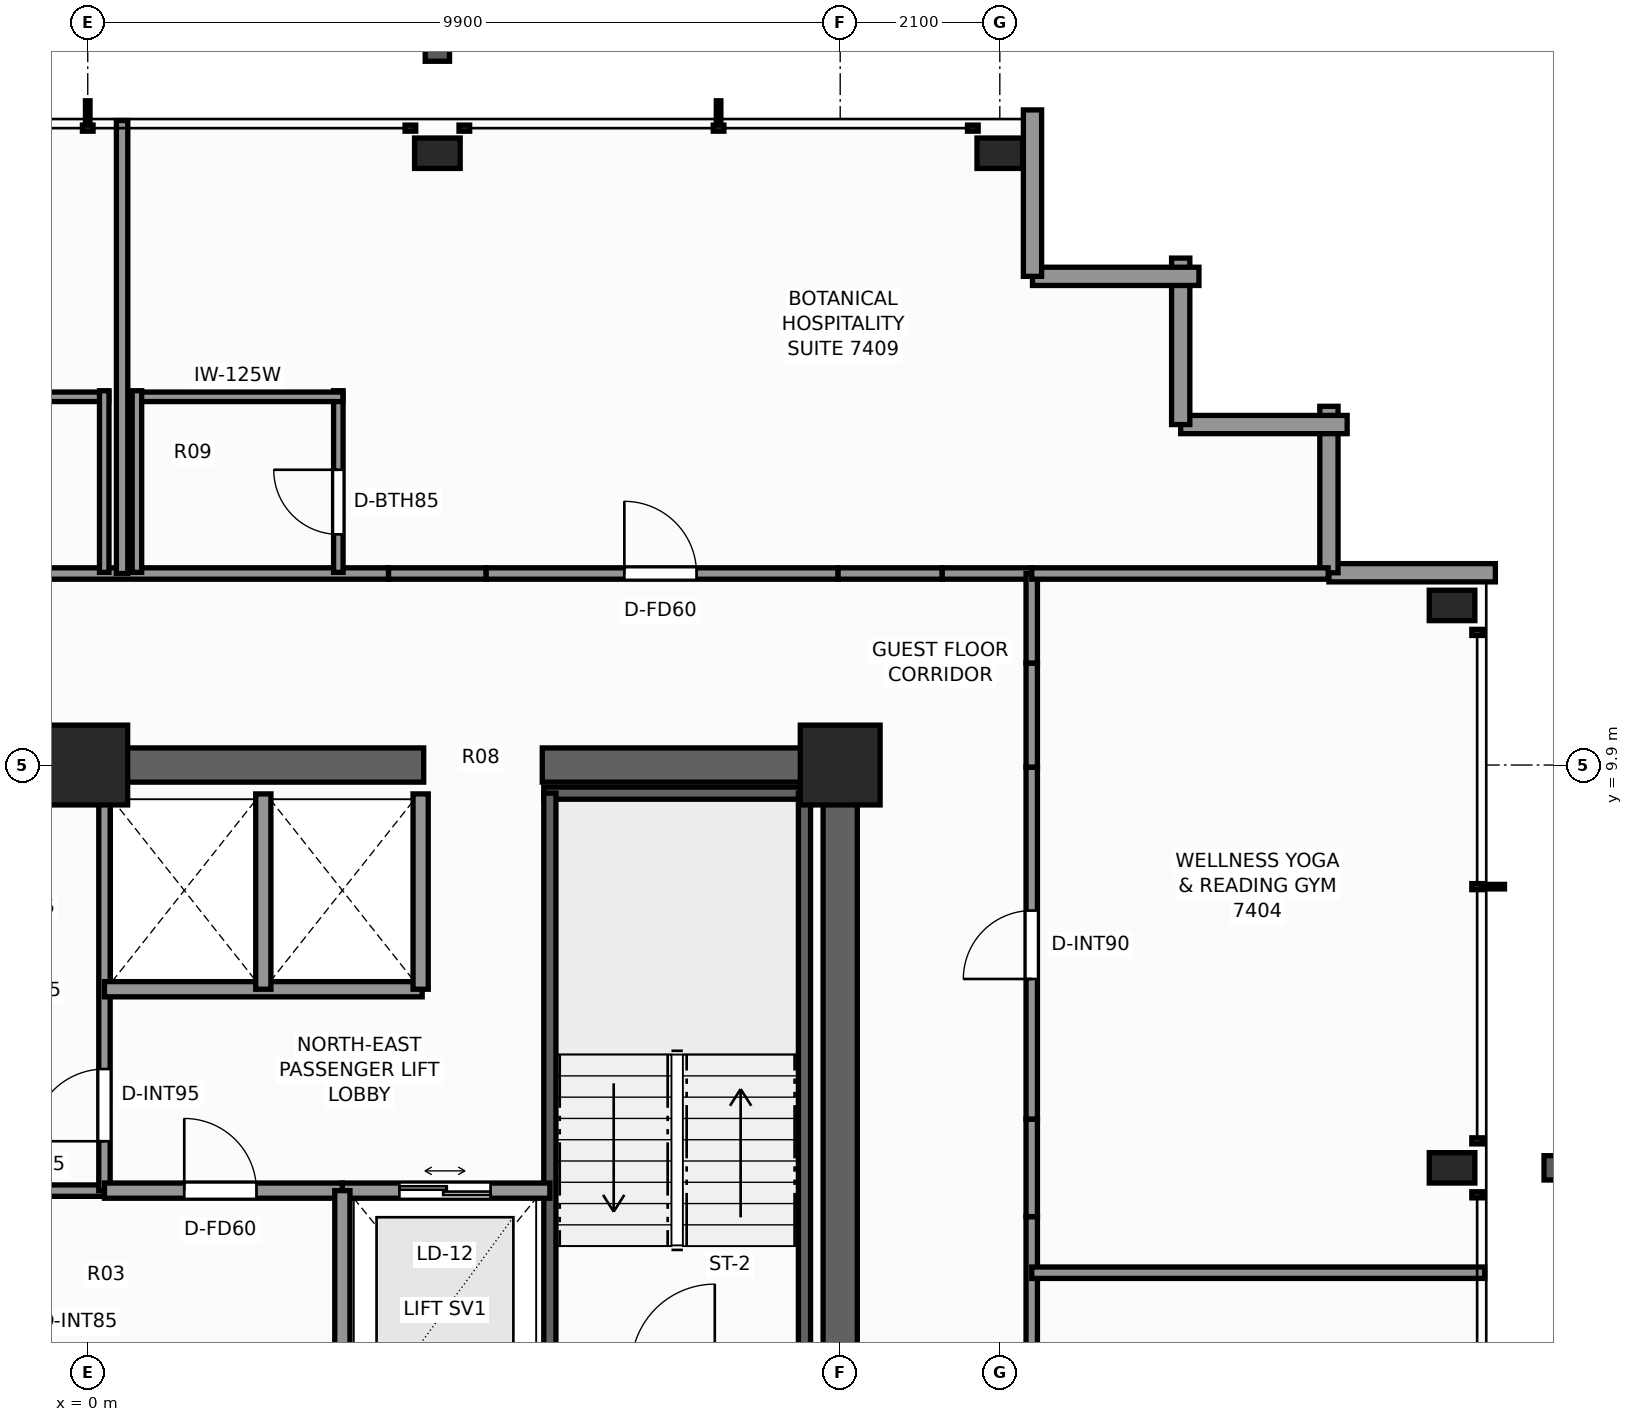
"""IFC4 building model, lengths in metres.
Left out: names, types, materials, properties, quantities, classifications, styles, units other than length and angle.
Written with IfcOpenShell. Run it as: python <this file> out.ifc"""

import sys

from ifc_helpers import new_model, si_unit, direction, frame, frame_2d, origin, origin_2d, place, context, subcontext, project, spatial, rectangle, extrude, element, fill, save


model = new_model("IFC4")
c1 = context("Model", 3, precision=1e-05, world=origin(), true_north=direction((0.0, 1.0)))
c2 = subcontext(c1, "Body", "Model", "MODEL_VIEW")
j1 = project(units=[si_unit("LENGTHUNIT", "METRE"), si_unit("PLANEANGLEUNIT", "RADIAN")], contexts=[c1])
p1 = place(None, origin())
s1 = spatial("IfcSite", under=j1, at=p1, CompositionType="ELEMENT")
p2 = place(p1, origin())
s2 = spatial("IfcBuilding", under=s1, at=p2, CompositionType="ELEMENT")
p3 = place(p2, frame((0.0, 0.0, 254.9)))
s3 = spatial("IfcBuildingStorey", under=s2, at=p3, CompositionType="ELEMENT", Elevation=254.9)
p4 = place(p3, frame((-10.125, 9.9, 0.0), z_axis=(0.0, 0.0, 1.0), x_axis=(1.0, 0.0, 0.0)))
e1 = element("IfcWall", 1, at=p4, inside=s3, PredefinedType="SHEAR", context=c2, shape_type="SweptSolid", body=[
    extrude(rectangle(XDim=14.545, YDim=0.45, at=frame_2d((7.272, 0.0))), origin(), (0.0, 0.0, 1.0), 3.5),
])
p5 = place(p3, frame((5.98, 9.9, 0.0), z_axis=(0.0, 0.0, 1.0), x_axis=(1.0, 0.0, 0.0)))
e2 = element("IfcWall", 2, at=p5, inside=s3, PredefinedType="SHEAR", context=c2, shape_type="SweptSolid", body=[
    extrude(rectangle(XDim=4.145, YDim=0.45, at=frame_2d((2.073, 0.0))), origin(), (0.0, 0.0, 1.0), 3.5),
])
p6 = place(p3, frame((9.9, -3.7, 0.0), z_axis=(0.0, 0.0, 1.0), x_axis=(0.0, 1.0, 0.0)))
e3 = element("IfcWall", 3, at=p6, inside=s3, PredefinedType="SHEAR", context=c2, shape_type="SweptSolid", body=[
    extrude(rectangle(XDim=13.375, YDim=0.45, at=frame_2d((6.688, 0.0))), origin(), (0.0, 0.0, 1.0), 3.5),
])
p7 = place(p6, frame((0.35, 0.0, 0.0)))
e4 = element("IfcOpeningElement", 4, at=p7, cuts=e3, PredefinedType="OPENING", context=c2, shape_type="SweptSolid", body=[
    extrude(rectangle(XDim=1.1, YDim=2.2, at=frame_2d((0.55, 1.1))), frame((0.0, 0.235, 0.0), z_axis=(0.0, -1.0, 0.0), x_axis=(1.0, 0.0, 0.0)), (0.0, 0.0, 1.0), 0.47),
])
for number, where, z_axis, x_axis in (
    (5, (9.9, 9.9, 0.0), (0.0, 0.0, 1.0), (1.0, 0.0, 0.0)),
    (6, (0.0, 9.9, 0.0), (0.0, 0.0, 1.0), (1.0, 0.0, 0.0)),
):
    element("IfcColumn", number, at=place(p3, frame(where, z_axis=z_axis, x_axis=x_axis)), inside=s3, PredefinedType="COLUMN", context=c2, shape_type="SweptSolid", body=[
        extrude(rectangle(XDim=1.05, YDim=1.05, at=origin_2d()), origin(), (0.0, 0.0, 1.0), 3.5),
    ])
for number, where, z_axis, x_axis in (
    (7, (4.6, 17.95, 0.0), (0.0, 0.0, 1.0), (1.0, 0.0, 0.0)),
    (8, (12.0, 17.95, 0.0), (0.0, 0.0, 1.0), (1.0, 0.0, 0.0)),
    (9, (17.95, 4.6, 0.0), (0.0, 0.0, 1.0), (1.0, 0.0, 0.0)),
    (10, (17.95, 12.0, 0.0), (0.0, 0.0, 1.0), (1.0, 0.0, 0.0)),
):
    element("IfcColumn", number, at=place(p3, frame(where, z_axis=z_axis, x_axis=x_axis)), inside=s3, PredefinedType="COLUMN", context=c2, shape_type="SweptSolid", body=[
        extrude(rectangle(XDim=0.6, YDim=0.4, at=origin_2d()), origin(), (0.0, 0.0, 1.0), 3.5),
    ])
p8 = place(p3, frame((16.33, 12.43, 0.0), z_axis=(0.0, 0.0, 1.0), x_axis=(1.0, 0.0, 0.0)))
e11 = element("IfcWall", 11, at=p8, inside=s3, PredefinedType="STANDARD", context=c2, shape_type="SweptSolid", body=[
    extrude(rectangle(XDim=2.19, YDim=0.24, at=frame_2d((1.095, 0.0))), origin(), (0.0, 0.0, 1.0), 1.415),
])
for number, where, z_axis, x_axis in (
    (12, (16.33, 14.62, 0.0), (0.0, 0.0, 1.0), (0.0, -1.0, 0.0)),
    (13, (14.38, 14.38, 0.0), (0.0, 0.0, 1.0), (1.0, 0.0, 0.0)),
    (14, (14.38, 16.57, 0.0), (0.0, 0.0, 1.0), (0.0, -1.0, 0.0)),
    (15, (12.43, 16.33, 0.0), (0.0, 0.0, 1.0), (1.0, 0.0, 0.0)),
):
    element("IfcWall", number, at=place(p3, frame(where, z_axis=z_axis, x_axis=x_axis)), inside=s3, PredefinedType="STANDARD", context=c2, shape_type="SweptSolid", body=[
        extrude(rectangle(XDim=2.19, YDim=0.24, at=frame_2d((1.095, 0.0))), origin(), (0.0, 0.0, 1.0), 2.603),
    ])
p9 = place(p3, frame((12.43, 18.52, 0.0), z_axis=(0.0, 0.0, 1.0), x_axis=(0.0, -1.0, 0.0)))
e16 = element("IfcWall", 16, at=p9, inside=s3, PredefinedType="STANDARD", context=c2, shape_type="SweptSolid", body=[
    extrude(rectangle(XDim=2.19, YDim=0.24, at=frame_2d((1.095, 0.0))), origin(), (0.0, 0.0, 1.0), 1.415),
])
p10 = place(p3, frame((6.0, 9.53, 0.0), z_axis=(0.0, 0.0, 1.0), x_axis=(1.0, 0.0, 0.0)))
e17 = element("IfcWall", 17, at=p10, inside=s3, PredefinedType="SHEAR", context=c2, shape_type="SweptSolid", body=[
    extrude(rectangle(XDim=3.52, YDim=0.16, at=frame_2d((1.76, 0.0))), origin(), (0.0, 0.0, 1.0), 3.5),
])
for number, where, z_axis, x_axis in (
    (18, (6.08, 1.97, 0.0), (0.0, 0.0, 1.0), (0.0, 1.0, 0.0)),
    (19, (9.43, 1.97, 0.0), (0.0, 0.0, 1.0), (0.0, 1.0, 0.0)),
):
    element("IfcWall", number, at=place(p3, frame(where, z_axis=z_axis, x_axis=x_axis)), inside=s3, PredefinedType="SHEAR", context=c2, shape_type="SweptSolid", body=[
        extrude(rectangle(XDim=7.56, YDim=0.16, at=frame_2d((3.78, 0.0))), origin(), (0.0, 0.0, 1.0), 3.5),
    ])
p11 = place(p3, frame((3.35, 4.3, 0.0), z_axis=(0.0, 0.0, 1.0), x_axis=(1.0, 0.0, 0.0)))
e20 = element("IfcWall", 20, at=p11, inside=s3, PredefinedType="SOLIDWALL", context=c2, shape_type="SweptSolid", body=[
    extrude(rectangle(XDim=2.73, YDim=0.2, at=frame_2d((1.365, 0.0))), origin(), (0.0, 0.0, 1.0), 3.22),
])
p12 = place(p11, frame((0.75, 0.0, 0.0)))
e21 = element("IfcOpeningElement", 21, at=p12, cuts=e20, PredefinedType="OPENING", context=c2, shape_type="SweptSolid", body=[
    extrude(rectangle(XDim=1.2, YDim=2.25, at=frame_2d((0.6, 1.125))), frame((0.0, 0.11, 0.0), z_axis=(0.0, -1.0, 0.0), x_axis=(1.0, 0.0, 0.0)), (0.0, 0.0, 1.0), 0.22),
])
p13 = place(p3, frame((-6.08, 4.3, 0.0), z_axis=(0.0, 0.0, 1.0), x_axis=(1.0, 0.0, 0.0)))
e22 = element("IfcWall", 22, at=p13, inside=s3, PredefinedType="PARTITIONING", context=c2, shape_type="SweptSolid", body=[
    extrude(rectangle(XDim=6.3, YDim=0.15, at=frame_2d((3.15, 0.0))), origin(), (0.0, 0.0, 1.0), 3.22),
])
p14 = place(p13, frame((1.05, 0.0, 0.0)))
e23 = element("IfcOpeningElement", 23, at=p14, cuts=e22, PredefinedType="OPENING", context=c2, shape_type="SweptSolid", body=[
    extrude(rectangle(XDim=0.85, YDim=2.03, at=frame_2d((0.425, 1.015))), frame((0.0, 0.085, 0.0), z_axis=(0.0, -1.0, 0.0), x_axis=(1.0, 0.0, 0.0)), (0.0, 0.0, 1.0), 0.17),
])
p15 = place(p3, frame((0.22, 4.3, 0.0), z_axis=(0.0, 0.0, 1.0), x_axis=(0.0, 1.0, 0.0)))
e24 = element("IfcWall", 24, at=p15, inside=s3, PredefinedType="PARTITIONING", context=c2, shape_type="SweptSolid", body=[
    extrude(rectangle(XDim=5.22, YDim=0.15, at=frame_2d((2.61, 0.0))), origin(), (0.0, 0.0, 1.0), 3.22),
])
p16 = place(p15, frame((0.65, 0.0, 0.0)))
e25 = element("IfcOpeningElement", 25, at=p16, cuts=e24, PredefinedType="OPENING", context=c2, shape_type="SweptSolid", body=[
    extrude(rectangle(XDim=0.95, YDim=2.06, at=frame_2d((0.475, 1.03))), frame((0.0, 0.085, 0.0), z_axis=(0.0, -1.0, 0.0), x_axis=(1.0, 0.0, 0.0)), (0.0, 0.0, 1.0), 0.17),
])
p17 = place(p3, frame((0.22, 6.95, 0.0), z_axis=(0.0, 0.0, 1.0), x_axis=(1.0, 0.0, 0.0)))
e26 = element("IfcWall", 26, at=p17, inside=s3, PredefinedType="SOLIDWALL", context=c2, shape_type="SweptSolid", body=[
    extrude(rectangle(XDim=4.18, YDim=0.2, at=frame_2d((2.09, 0.0))), origin(), (0.0, 0.0, 1.0), 3.22),
])
for number, where, z_axis, x_axis in (
    (27, (4.38, 6.95, 0.0), (0.0, 0.0, 1.0), (0.0, 1.0, 0.0)),
    (28, (2.31, 6.95, 0.0), (0.0, 0.0, 1.0), (0.0, 1.0, 0.0)),
):
    element("IfcWall", number, at=place(p3, frame(where, z_axis=z_axis, x_axis=x_axis)), inside=s3, PredefinedType="SOLIDWALL", context=c2, shape_type="SweptSolid", body=[
        extrude(rectangle(XDim=2.57, YDim=0.2, at=frame_2d((1.285, 0.0))), origin(), (0.0, 0.0, 1.0), 3.22),
    ])
p18 = place(p3, frame((0.22, 4.3, 0.0), z_axis=(0.0, 0.0, 1.0), x_axis=(1.0, 0.0, 0.0)))
e29 = element("IfcWall", 29, at=p18, inside=s3, PredefinedType="SOLIDWALL", context=c2, shape_type="SweptSolid", body=[
    extrude(rectangle(XDim=3.13, YDim=0.2, at=frame_2d((1.565, 0.0))), origin(), (0.0, 0.0, 1.0), 3.22),
])
p19 = place(p18, frame((1.05, 0.0, 0.0)))
e30 = element("IfcOpeningElement", 30, at=p19, cuts=e29, PredefinedType="OPENING", context=c2, shape_type="SweptSolid", body=[
    extrude(rectangle(XDim=0.95, YDim=2.06, at=frame_2d((0.475, 1.03))), frame((0.0, 0.11, 0.0), z_axis=(0.0, -1.0, 0.0), x_axis=(1.0, 0.0, 0.0)), (0.0, 0.0, 1.0), 0.22),
])
p20 = place(p3, frame((3.35, 1.1, 0.0), z_axis=(0.0, 0.0, 1.0), x_axis=(0.0, 1.0, 0.0)))
e31 = element("IfcWall", 31, at=p20, inside=s3, PredefinedType="SOLIDWALL", context=c2, shape_type="SweptSolid", body=[
    extrude(rectangle(XDim=3.2, YDim=0.2, at=frame_2d((1.6, 0.0))), origin(), (0.0, 0.0, 1.0), 3.22),
])
p21 = place(p3, frame((-3.958, 12.42, 0.0), z_axis=(0.0, 0.0, 1.0), x_axis=(1.0, 0.0, 0.0)))
e32 = element("IfcWall", 32, at=p21, inside=s3, PredefinedType="PARTITIONING", context=c2, shape_type="SweptSolid", body=[
    extrude(rectangle(XDim=7.916, YDim=0.15, at=frame_2d((3.958, 0.0))), origin(), (0.0, 0.0, 1.0), 2.745),
])
p22 = place(p3, frame((3.958, 12.42, 0.0), z_axis=(0.0, 0.0, 1.0), x_axis=(1.0, 0.0, 0.0)))
e33 = element("IfcWall", 33, at=p22, inside=s3, PredefinedType="PARTITIONING", context=c2, shape_type="SweptSolid", body=[
    extrude(rectangle(XDim=1.284, YDim=0.15, at=frame_2d((0.642, 0.0))), origin(), (0.0, 0.0, 1.0), 1.405),
])
p23 = place(p3, frame((5.242, 12.42, 0.0), z_axis=(0.0, 0.0, 1.0), x_axis=(1.0, 0.0, 0.0)))
e34 = element("IfcWall", 34, at=p23, inside=s3, PredefinedType="PARTITIONING", context=c2, shape_type="SweptSolid", body=[
    extrude(rectangle(XDim=4.63, YDim=0.15, at=frame_2d((2.315, 0.0))), origin(), (0.0, 0.0, 1.0), 3.22),
])
p24 = place(p23, frame((1.818, 0.0, 0.0)))
e35 = element("IfcOpeningElement", 35, at=p24, cuts=e34, PredefinedType="OPENING", context=c2, shape_type="SweptSolid", body=[
    extrude(rectangle(XDim=0.95, YDim=2.06, at=frame_2d((0.475, 1.03))), frame((0.0, 0.085, 0.0), z_axis=(0.0, -1.0, 0.0), x_axis=(1.0, 0.0, 0.0)), (0.0, 0.0, 1.0), 0.17),
])
p25 = place(p3, frame((9.872, 12.42, 0.0), z_axis=(0.0, 0.0, 1.0), x_axis=(1.0, 0.0, 0.0)))
e36 = element("IfcWall", 36, at=p25, inside=s3, PredefinedType="PARTITIONING", context=c2, shape_type="SweptSolid", body=[
    extrude(rectangle(XDim=1.37, YDim=0.15, at=frame_2d((0.685, 0.0))), origin(), (0.0, 0.0, 1.0), 1.405),
])
p26 = place(p3, frame((11.242, 12.42, 0.0), z_axis=(0.0, 0.0, 1.0), x_axis=(1.0, 0.0, 0.0)))
e37 = element("IfcWall", 37, at=p26, inside=s3, PredefinedType="PARTITIONING", context=c2, shape_type="SweptSolid", body=[
    extrude(rectangle(XDim=1.177, YDim=0.15, at=frame_2d((0.589, 0.0))), origin(), (0.0, 0.0, 1.0), 3.22),
])
p27 = place(p3, frame((12.42, -3.958, 0.0), z_axis=(0.0, 0.0, 1.0), x_axis=(0.0, 1.0, 0.0)))
e38 = element("IfcWall", 38, at=p27, inside=s3, PredefinedType="PARTITIONING", context=c2, shape_type="SweptSolid", body=[
    extrude(rectangle(XDim=7.916, YDim=0.15, at=frame_2d((3.958, 0.0))), origin(), (0.0, 0.0, 1.0), 2.745),
])
p28 = place(p3, frame((12.42, 3.958, 0.0), z_axis=(0.0, 0.0, 1.0), x_axis=(0.0, 1.0, 0.0)))
e39 = element("IfcWall", 39, at=p28, inside=s3, PredefinedType="PARTITIONING", context=c2, shape_type="SweptSolid", body=[
    extrude(rectangle(XDim=1.284, YDim=0.15, at=frame_2d((0.642, 0.0))), origin(), (0.0, 0.0, 1.0), 1.405),
])
p29 = place(p3, frame((12.42, 5.242, 0.0), z_axis=(0.0, 0.0, 1.0), x_axis=(0.0, 1.0, 0.0)))
e40 = element("IfcWall", 40, at=p29, inside=s3, PredefinedType="PARTITIONING", context=c2, shape_type="SweptSolid", body=[
    extrude(rectangle(XDim=4.63, YDim=0.15, at=frame_2d((2.315, 0.0))), origin(), (0.0, 0.0, 1.0), 3.22),
])
p30 = place(p29, frame((1.843, 0.0, 0.0)))
e41 = element("IfcOpeningElement", 41, at=p30, cuts=e40, PredefinedType="OPENING", context=c2, shape_type="SweptSolid", body=[
    extrude(rectangle(XDim=0.9, YDim=2.06, at=frame_2d((0.45, 1.03))), frame((0.0, 0.085, 0.0), z_axis=(0.0, -1.0, 0.0), x_axis=(1.0, 0.0, 0.0)), (0.0, 0.0, 1.0), 0.17),
])
p31 = place(p3, frame((12.42, 9.872, 0.0), z_axis=(0.0, 0.0, 1.0), x_axis=(0.0, 1.0, 0.0)))
e42 = element("IfcWall", 42, at=p31, inside=s3, PredefinedType="PARTITIONING", context=c2, shape_type="SweptSolid", body=[
    extrude(rectangle(XDim=1.37, YDim=0.15, at=frame_2d((0.685, 0.0))), origin(), (0.0, 0.0, 1.0), 1.405),
])
p32 = place(p3, frame((12.42, 11.242, 0.0), z_axis=(0.0, 0.0, 1.0), x_axis=(0.0, 1.0, 0.0)))
e43 = element("IfcWall", 43, at=p32, inside=s3, PredefinedType="PARTITIONING", context=c2, shape_type="SweptSolid", body=[
    extrude(rectangle(XDim=1.177, YDim=0.15, at=frame_2d((0.589, 0.0))), origin(), (0.0, 0.0, 1.0), 3.22),
])
p33 = place(p3, frame((12.42, 12.42, 0.0), z_axis=(0.0, 0.0, 1.0), x_axis=(1.0, 0.0, 0.0)))
e44 = element("IfcWall", 44, at=p33, inside=s3, PredefinedType="PARTITIONING", context=c2, shape_type="SweptSolid", body=[
    extrude(rectangle(XDim=3.9, YDim=0.15, at=frame_2d((1.95, 0.0))), origin(), (0.0, 0.0, 1.0), 3.22),
])
for number, where, z_axis, x_axis in (
    (45, (12.42, 3.22, 0.0), (0.0, 0.0, 1.0), (1.0, 0.0, 0.0)),
    (46, (0.452, 12.42, 0.0), (0.0, 0.0, 1.0), (0.0, 1.0, 0.0)),
):
    element("IfcWall", number, at=place(p3, frame(where, z_axis=z_axis, x_axis=x_axis)), inside=s3, PredefinedType="PARTITIONING", context=c2, shape_type="SweptSolid", body=[
        extrude(rectangle(XDim=5.96, YDim=0.15, at=frame_2d((2.98, 0.0))), origin(), (0.0, 0.0, 1.0), 2.593),
    ])
p34 = place(p3, frame((-2.493, 14.745, 0.0), z_axis=(0.0, 0.0, 1.0), x_axis=(1.0, 0.0, 0.0)))
e47 = element("IfcWall", 47, at=p34, inside=s3, PredefinedType="PARTITIONING", context=c2, shape_type="SweptSolid", body=[
    extrude(rectangle(XDim=2.77, YDim=0.125, at=frame_2d((1.385, 0.0))), origin(), (0.0, 0.0, 1.0), 2.745),
])
p35 = place(p3, frame((0.217, 12.435, 0.0), z_axis=(0.0, 0.0, 1.0), x_axis=(0.0, 1.0, 0.0)))
e48 = element("IfcWall", 48, at=p35, inside=s3, PredefinedType="PARTITIONING", context=c2, shape_type="SweptSolid", body=[
    extrude(rectangle(XDim=2.39, YDim=0.125, at=frame_2d((1.195, 0.0))), origin(), (0.0, 0.0, 1.0), 3.22),
])
p36 = place(p3, frame((3.297, 12.435, 0.0), z_axis=(0.0, 0.0, 1.0), x_axis=(0.0, 1.0, 0.0)))
e49 = element("IfcWall", 49, at=p36, inside=s3, PredefinedType="PARTITIONING", context=c2, shape_type="SweptSolid", body=[
    extrude(rectangle(XDim=2.39, YDim=0.125, at=frame_2d((1.195, 0.0))), origin(), (0.0, 0.0, 1.0), 3.22),
])
p37 = place(p36, frame((0.5, 0.0, 0.0)))
e50 = element("IfcOpeningElement", 50, at=p37, cuts=e49, PredefinedType="OPENING", context=c2, shape_type="SweptSolid", body=[
    extrude(rectangle(XDim=0.85, YDim=2.03, at=frame_2d((0.425, 1.015))), frame((0.0, 0.073, 0.0), z_axis=(0.0, -1.0, 0.0), x_axis=(1.0, 0.0, 0.0)), (0.0, 0.0, 1.0), 0.145),
])
p38 = place(p3, frame((0.587, 14.745, 0.0), z_axis=(0.0, 0.0, 1.0), x_axis=(1.0, 0.0, 0.0)))
e51 = element("IfcWall", 51, at=p38, inside=s3, PredefinedType="PARTITIONING", context=c2, shape_type="SweptSolid", body=[
    extrude(rectangle(XDim=2.77, YDim=0.125, at=frame_2d((1.385, 0.0))), origin(), (0.0, 0.0, 1.0), 3.22),
])
p39 = place(p3, frame((0.647, 12.435, 0.0), z_axis=(0.0, 0.0, 1.0), x_axis=(0.0, 1.0, 0.0)))
e52 = element("IfcWall", 52, at=p39, inside=s3, PredefinedType="PARTITIONING", context=c2, shape_type="SweptSolid", body=[
    extrude(rectangle(XDim=2.39, YDim=0.125, at=frame_2d((1.195, 0.0))), origin(), (0.0, 0.0, 1.0), 3.22),
])
p40 = place(p12, origin())
e53 = element("IfcDoor", 53, at=p40, inside=s3, OperationType="DOUBLE_DOOR_SLIDING", PredefinedType="DOOR", context=c2, shape_type="SweptSolid", body=[
    extrude(rectangle(XDim=1.2, YDim=2.25, at=frame_2d((0.6, 1.125))), frame((0.0, 0.025, 0.0), z_axis=(0.0, -1.0, 0.0), x_axis=(1.0, 0.0, 0.0)), (0.0, 0.0, 1.0), 0.05),
])
fill(e21, e53)
p41 = place(p16, origin())
e54 = element("IfcDoor", 54, at=p41, inside=s3, OperationType="SINGLE_SWING_LEFT", PredefinedType="DOOR", context=c2, shape_type="SweptSolid", body=[
    extrude(rectangle(XDim=0.95, YDim=2.06, at=frame_2d((0.475, 1.03))), frame((0.0, 0.025, 0.0), z_axis=(0.0, -1.0, 0.0), x_axis=(1.0, 0.0, 0.0)), (0.0, 0.0, 1.0), 0.05),
])
fill(e25, e54)
p42 = place(p19, origin())
e55 = element("IfcDoor", 55, at=p42, inside=s3, OperationType="SINGLE_SWING_LEFT", PredefinedType="DOOR", context=c2, shape_type="SweptSolid", body=[
    extrude(rectangle(XDim=0.95, YDim=2.06, at=frame_2d((0.475, 1.03))), frame((0.0, 0.025, 0.0), z_axis=(0.0, -1.0, 0.0), x_axis=(1.0, 0.0, 0.0)), (0.0, 0.0, 1.0), 0.05),
])
fill(e30, e55)
p43 = place(p30, origin())
e56 = element("IfcDoor", 56, at=p43, inside=s3, OperationType="SINGLE_SWING_LEFT", PredefinedType="DOOR", context=c2, shape_type="SweptSolid", body=[
    extrude(rectangle(XDim=0.9, YDim=2.06, at=frame_2d((0.45, 1.03))), frame((0.0, 0.025, 0.0), z_axis=(0.0, -1.0, 0.0), x_axis=(1.0, 0.0, 0.0)), (0.0, 0.0, 1.0), 0.05),
])
fill(e41, e56)
p44 = place(p37, origin())
e57 = element("IfcDoor", 57, at=p44, inside=s3, OperationType="SINGLE_SWING_RIGHT", PredefinedType="DOOR", context=c2, shape_type="SweptSolid", body=[
    extrude(rectangle(XDim=0.85, YDim=2.03, at=frame_2d((0.425, 1.015))), frame((0.0, 0.025, 0.0), z_axis=(0.0, -1.0, 0.0), x_axis=(1.0, 0.0, 0.0)), (0.0, 0.0, 1.0), 0.05),
])
fill(e50, e57)
p45 = place(p24, origin())
e58 = element("IfcDoor", 58, at=p45, inside=s3, OperationType="SINGLE_SWING_LEFT", PredefinedType="DOOR", context=c2, shape_type="SweptSolid", body=[
    extrude(rectangle(XDim=0.95, YDim=2.06, at=frame_2d((0.475, 1.03))), frame((0.0, 0.025, 0.0), z_axis=(0.0, -1.0, 0.0), x_axis=(1.0, 0.0, 0.0)), (0.0, 0.0, 1.0), 0.05),
])
fill(e35, e58)
save(model, sys.argv[1])
